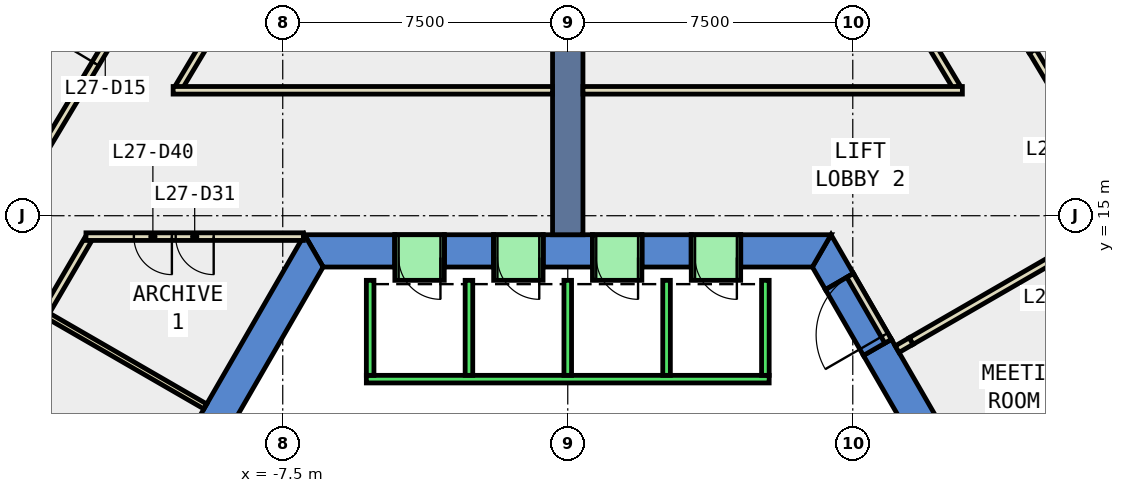
"""IFC4 building model, lengths in metres.
Left out: names, types, materials, properties, quantities, classifications, styles, units other than length and angle.
Written with IfcOpenShell. Run it as: python <this file> out.ifc"""

import sys

from ifc_helpers import new_model, si_unit, direction, frame, frame_2d, origin, place, context, subcontext, project, spatial, polyline, rectangle, outline, extrude, element, fill, save


model = new_model("IFC4")
c1 = context("Model", 3, precision=1e-05, world=origin(), true_north=direction((0.0, 1.0)))
c2 = subcontext(c1, "Body", "Model", "MODEL_VIEW")
j1 = project(units=[si_unit("LENGTHUNIT", "METRE"), si_unit("PLANEANGLEUNIT", "RADIAN")], contexts=[c1])
p1 = place(None, origin())
s1 = spatial("IfcSite", under=j1, at=p1, CompositionType="ELEMENT")
p2 = place(p1, origin())
s2 = spatial("IfcBuilding", under=s1, at=p2, CompositionType="ELEMENT")
p3 = place(p2, frame((0.0, 0.0, 124.4)))
s3 = spatial("IfcBuildingStorey", under=s2, at=p3, CompositionType="ELEMENT", Elevation=124.4)
p4 = place(p3, frame((0.0, 0.0, -0.4)))
e1 = element("IfcWall", 1, at=p4, inside=s3, PredefinedType="SHEAR", context=c2, shape_type="SweptSolid", body=[
    extrude(outline(polyline([(8.517, 11.748), (7.781, 11.323), (12.875, 2.5), (13.856, 2.5), (8.517, 11.748)])), origin(), (0.0, 0.0, 1.0), 4.2),
])
p5 = place(p3, frame((0.0, 0.0, -0.4)))
e2 = element("IfcWall", 2, at=p5, inside=s3, PredefinedType="SHEAR", context=c2, shape_type="SweptSolid", body=[
    extrude(outline(polyline([(6.781, 13.055), (7.517, 13.48), (6.928, 14.5), (6.437, 13.65), (6.781, 13.055)])), origin(), (0.0, 0.0, 1.0), 4.2),
])
p6 = place(p3, frame((0.0, 0.0, 3.6)))
e3 = element("IfcWall", 3, at=p6, inside=s3, PredefinedType="SHEAR", context=c2, shape_type="SweptSolid", body=[
    extrude(outline(polyline([(7.517, 13.48), (6.781, 13.055), (7.781, 11.323), (8.517, 11.748), (7.517, 13.48)])), origin(), (0.0, 0.0, 1.0), 0.2),
])
p7 = place(p3, frame((0.0, 0.0, -0.4)))
e4 = element("IfcWall", 4, at=p7, inside=s3, PredefinedType="SHEAR", context=c2, shape_type="SweptSolid", body=[
    extrude(outline(polyline([(4.55, 14.5), (4.55, 13.65), (6.437, 13.65), (6.928, 14.5), (4.55, 14.5)])), origin(), (0.0, 0.0, 1.0), 4.2),
])
p8 = place(p3, frame((0.0, 0.0, -0.4)))
e5 = element("IfcWall", 5, at=p8, inside=s3, PredefinedType="SHEAR", context=c2, shape_type="SweptSolid", body=[
    extrude(outline(polyline([(1.95, 14.5), (1.95, 13.65), (3.25, 13.65), (3.25, 14.5), (1.95, 14.5)])), origin(), (0.0, 0.0, 1.0), 4.2),
])
p9 = place(p3, frame((0.0, 0.0, -0.4)))
e6 = element("IfcWall", 6, at=p9, inside=s3, PredefinedType="SHEAR", context=c2, shape_type="SweptSolid", body=[
    extrude(outline(polyline([(-0.65, 14.5), (-0.65, 13.65), (0.65, 13.65), (0.65, 14.5), (-0.65, 14.5)])), origin(), (0.0, 0.0, 1.0), 4.2),
])
p10 = place(p3, frame((0.0, 0.0, -0.4)))
e7 = element("IfcWall", 7, at=p10, inside=s3, PredefinedType="SHEAR", context=c2, shape_type="SweptSolid", body=[
    extrude(outline(polyline([(-3.25, 14.5), (-3.25, 13.65), (-1.95, 13.65), (-1.95, 14.5), (-3.25, 14.5)])), origin(), (0.0, 0.0, 1.0), 4.2),
])
p11 = place(p3, frame((0.0, 0.0, -0.4)))
e8 = element("IfcWall", 8, at=p11, inside=s3, PredefinedType="SHEAR", context=c2, shape_type="SweptSolid", body=[
    extrude(outline(polyline([(-4.55, 13.65), (-4.55, 14.5), (-6.928, 14.5), (-6.437, 13.65), (-4.55, 13.65)])), origin(), (0.0, 0.0, 1.0), 4.2),
])
p12 = place(p3, frame((0.0, 0.0, 3.6)))
e9 = element("IfcWall", 9, at=p12, inside=s3, PredefinedType="SHEAR", context=c2, shape_type="SweptSolid", body=[
    extrude(outline(polyline([(3.25, 14.5), (3.25, 13.65), (4.55, 13.65), (4.55, 14.5), (3.25, 14.5)])), origin(), (0.0, 0.0, 1.0), 0.2),
])
p13 = place(p3, frame((0.0, 0.0, 3.6)))
e10 = element("IfcWall", 10, at=p13, inside=s3, PredefinedType="SHEAR", context=c2, shape_type="SweptSolid", body=[
    extrude(outline(polyline([(0.65, 14.5), (0.65, 13.65), (1.95, 13.65), (1.95, 14.5), (0.65, 14.5)])), origin(), (0.0, 0.0, 1.0), 0.2),
])
p14 = place(p3, frame((0.0, 0.0, 3.6)))
e11 = element("IfcWall", 11, at=p14, inside=s3, PredefinedType="SHEAR", context=c2, shape_type="SweptSolid", body=[
    extrude(outline(polyline([(-1.95, 14.5), (-1.95, 13.65), (-0.65, 13.65), (-0.65, 14.5), (-1.95, 14.5)])), origin(), (0.0, 0.0, 1.0), 0.2),
])
p15 = place(p3, frame((0.0, 0.0, 3.6)))
e12 = element("IfcWall", 12, at=p15, inside=s3, PredefinedType="SHEAR", context=c2, shape_type="SweptSolid", body=[
    extrude(outline(polyline([(-4.55, 14.5), (-4.55, 13.65), (-3.25, 13.65), (-3.25, 14.5), (-4.55, 14.5)])), origin(), (0.0, 0.0, 1.0), 0.2),
])
p16 = place(p3, frame((0.0, 0.0, -0.4)))
e13 = element("IfcWall", 13, at=p16, inside=s3, PredefinedType="SHEAR", context=c2, shape_type="SweptSolid", body=[
    extrude(outline(polyline([(-12.267, 5.252), (-11.531, 4.827), (-6.437, 13.65), (-6.928, 14.5), (-12.267, 5.252)])), origin(), (0.0, 0.0, 1.0), 4.2),
])
p17 = place(p3, frame((0.0, 14.5, -0.4), z_axis=(0.0, 0.0, 1.0), x_axis=(0.0, 1.0, 0.0)))
e14 = element("IfcWall", 14, at=p17, inside=s3, PredefinedType="SHEAR", context=c2, shape_type="SweptSolid", body=[
    extrude(rectangle(XDim=9.0, YDim=0.8, at=frame_2d((4.5, 0.0))), origin(), (0.0, 0.0, 1.0), 4.2),
])
p18 = place(p3, frame((-12.628, 14.364, 0.0), z_axis=(0.0, 0.0, 1.0), x_axis=(-0.504457175129, -0.863436713639, 0.0)))
e15 = element("IfcWall", 15, at=p18, inside=s3, PredefinedType="PARTITIONING", context=c2, shape_type="SweptSolid", body=[
    extrude(rectangle(XDim=2.175, YDim=0.2, at=frame_2d((1.087, 0.0))), origin(), (0.0, 0.0, 1.0), 3.8),
])
p19 = place(p3, frame((12.798, 13.873, 0.0), z_axis=(0.0, 0.0, 1.0), x_axis=(-0.866080799279, -0.499904039911, 0.0)))
e16 = element("IfcWall", 16, at=p19, inside=s3, PredefinedType="PARTITIONING", context=c2, shape_type="SweptSolid", body=[
    extrude(rectangle(XDim=4.345, YDim=0.2, at=frame_2d((2.172, 0.0))), origin(), (0.0, 0.0, 1.0), 3.8),
])
for number, where, z_axis, x_axis in (
    (17, (10.232, 18.386, 0.0), (0.0, 0.0, 1.0), (-0.514, 0.858, 0.0)),
    (18, (-8.475, 21.321, 0.0), (0.0, 0.0, 1.0), (-0.514, -0.858, 0.0)),
):
    element("IfcWall", number, at=place(p3, frame(where, z_axis=z_axis, x_axis=x_axis)), inside=s3, PredefinedType="PARTITIONING", context=c2, shape_type="SweptSolid", body=[
        extrude(rectangle(XDim=3.421, YDim=0.2, at=frame_2d((1.71, 0.0))), origin(), (0.0, 0.0, 1.0), 3.8),
    ])
p20 = place(p3, frame((12.228, 19.335, 0.0), z_axis=(0.0, 0.0, 1.0), x_axis=(0.513796731551, -0.857911952736, 0.0)))
e19 = element("IfcWall", 19, at=p20, inside=s3, PredefinedType="PARTITIONING", context=c2, shape_type="SweptSolid", body=[
    extrude(rectangle(XDim=3.493, YDim=0.2, at=frame_2d((1.747, 0.0))), origin(), (0.0, 0.0, 1.0), 3.8),
])
p21 = place(p20, frame((1.247, 0.0, 0.0)))
e20 = element("IfcOpeningElement", 20, at=p21, cuts=e19, PredefinedType="OPENING", context=c2, shape_type="SweptSolid", body=[
    extrude(rectangle(XDim=1.0, YDim=2.1, at=frame_2d((0.5, 1.05))), frame((0.0, 0.11, 0.0), z_axis=(0.0, -1.0, 0.0), x_axis=(1.0, 0.0, 0.0)), (0.0, 0.0, 1.0), 0.22),
])
p22 = place(p3, frame((-14.023, 16.338, 0.0), z_axis=(0.0, 0.0, 1.0), x_axis=(0.513773581048, 0.857925816966, 0.0)))
e21 = element("IfcWall", 21, at=p22, inside=s3, PredefinedType="PARTITIONING", context=c2, shape_type="SweptSolid", body=[
    extrude(rectangle(XDim=7.061, YDim=0.2, at=frame_2d((3.531, 0.0))), origin(), (0.0, 0.0, 1.0), 3.8),
])
p23 = place(p22, frame((3.106, 0.0, 0.0)))
e22 = element("IfcOpeningElement", 22, at=p23, cuts=e21, PredefinedType="OPENING", context=c2, shape_type="SweptSolid", body=[
    extrude(rectangle(XDim=1.0, YDim=2.1, at=frame_2d((0.5, 1.05))), frame((0.0, 0.11, 0.0), z_axis=(0.0, -1.0, 0.0), x_axis=(1.0, 0.0, 0.0)), (0.0, 0.0, 1.0), 0.22),
])
p24 = place(p3, frame((-9.537, 9.981, 0.0), z_axis=(0.0, 0.0, 1.0), x_axis=(-0.866035377451, 0.499982724704, 0.0)))
e23 = element("IfcWall", 23, at=p24, inside=s3, PredefinedType="PARTITIONING", context=c2, shape_type="SweptSolid", body=[
    extrude(rectangle(XDim=4.98, YDim=0.15, at=frame_2d((2.49, 0.0))), origin(), (0.0, 0.0, 1.0), 3.8),
])
p25 = place(p3, frame((-6.957, 14.45, 0.0), z_axis=(0.0, 0.0, 1.0), x_axis=(-1.0, 0.0, 0.0)))
e24 = element("IfcWall", 24, at=p25, inside=s3, PredefinedType="PARTITIONING", context=c2, shape_type="SweptSolid", body=[
    extrude(rectangle(XDim=5.721, YDim=0.2, at=frame_2d((2.86, 0.0))), origin(), (0.0, 0.0, 1.0), 3.8),
])
p26 = place(p25, frame((2.36, 0.0, 0.0)))
e25 = element("IfcOpeningElement", 25, at=p26, cuts=e24, PredefinedType="OPENING", context=c2, shape_type="SweptSolid", body=[
    extrude(rectangle(XDim=1.0, YDim=2.1, at=frame_2d((0.5, 1.05))), frame((0.0, 0.11, 0.0), z_axis=(0.0, -1.0, 0.0), x_axis=(1.0, 0.0, 0.0)), (0.0, 0.0, 1.0), 0.22),
])
p27 = place(p25, frame((3.46, 0.0, 0.0)))
e26 = element("IfcOpeningElement", 26, at=p27, cuts=e24, PredefinedType="OPENING", context=c2, shape_type="SweptSolid", body=[
    extrude(rectangle(XDim=1.0, YDim=2.1, at=frame_2d((0.5, 1.05))), frame((0.0, 0.11, 0.0), z_axis=(0.0, -1.0, 0.0), x_axis=(1.0, 0.0, 0.0)), (0.0, 0.0, 1.0), 0.22),
])
for number, where, z_axis, x_axis in (
    (27, (0.4, 18.3, 0.0), (0.0, 0.0, 1.0), (1.0, 0.0, 0.0)),
    (28, (-10.384, 18.3, 0.0), (0.0, 0.0, 1.0), (1.0, 0.0, 0.0)),
):
    element("IfcWall", number, at=place(p3, frame(where, z_axis=z_axis, x_axis=x_axis)), inside=s3, PredefinedType="PARTITIONING", context=c2, shape_type="SweptSolid", body=[
        extrude(rectangle(XDim=9.984, YDim=0.2, at=frame_2d((4.992, 0.0))), origin(), (0.0, 0.0, 1.0), 3.8),
    ])
p28 = place(p3, frame((12.104, 19.348, 0.0), z_axis=(0.0, 0.0, 1.0), x_axis=(0.85799008499, 0.513666247732, 0.0)))
e29 = element("IfcWall", 29, at=p28, inside=s3, PredefinedType="PARTITIONING", context=c2, shape_type="SweptSolid", body=[
    extrude(rectangle(XDim=7.1, YDim=0.15, at=frame_2d((3.55, 0.0))), origin(), (0.0, 0.0, 1.0), 3.8),
])
p29 = place(p3, frame((8.43, 11.698, 0.0), z_axis=(0.0, 0.0, 1.0), x_axis=(-0.50002537861, 0.866010750942, 0.0)))
e30 = element("IfcWall", 30, at=p29, inside=s3, PredefinedType="PARTITIONING", context=c2, shape_type="SweptSolid", body=[
    extrude(rectangle(XDim=2.0, YDim=0.2, at=frame_2d((1.0, 0.0))), origin(), (0.0, 0.0, 1.0), 2.4),
])
p30 = place(p29, frame((0.19, 0.0, 0.0)))
e31 = element("IfcOpeningElement", 31, at=p30, cuts=e30, PredefinedType="OPENING", context=c2, shape_type="SweptSolid", body=[
    extrude(rectangle(XDim=1.8, YDim=2.1, at=frame_2d((0.9, 1.05))), frame((0.0, 0.11, 0.0), z_axis=(0.0, -1.0, 0.0), x_axis=(1.0, 0.0, 0.0)), (0.0, 0.0, 1.0), 0.22),
])
p31 = place(p3, frame((9.035, 11.701, 0.0), z_axis=(0.0, 0.0, 1.0), x_axis=(-0.865544229481, -0.500832493767, 0.0)))
e32 = element("IfcWall", 32, at=p31, inside=s3, PredefinedType="PARTITIONING", context=c2, shape_type="SweptSolid", body=[
    extrude(rectangle(XDim=0.425, YDim=0.2, at=frame_2d((0.212, 0.0))), origin(), (0.0, 0.0, 1.0), 2.4),
])
p32 = place(p3, frame((5.3, 10.7, 0.0), z_axis=(0.0, 0.0, 1.0), x_axis=(-1.0, 0.0, 0.0)))
e33 = element("IfcWall", 33, at=p32, inside=s3, PredefinedType="STANDARD", context=c2, shape_type="SweptSolid", body=[
    extrude(rectangle(XDim=10.6, YDim=0.2, at=frame_2d((5.3, 0.0))), origin(), (0.0, 0.0, 1.0), 3.8),
])
for number, where, z_axis, x_axis in (
    (34, (5.2, 10.8, 0.0), (0.0, 0.0, 1.0), (0.0, 1.0, 0.0)),
    (35, (2.6, 10.8, 0.0), (0.0, 0.0, 1.0), (0.0, 1.0, 0.0)),
    (36, (0.0, 10.8, 0.0), (0.0, 0.0, 1.0), (0.0, 1.0, 0.0)),
    (37, (-2.6, 10.8, 0.0), (0.0, 0.0, 1.0), (0.0, 1.0, 0.0)),
    (38, (-5.2, 10.8, 0.0), (0.0, 0.0, 1.0), (0.0, 1.0, 0.0)),
):
    element("IfcWall", number, at=place(p3, frame(where, z_axis=z_axis, x_axis=x_axis)), inside=s3, PredefinedType="STANDARD", context=c2, shape_type="SweptSolid", body=[
        extrude(rectangle(XDim=2.5, YDim=0.2, at=frame_2d((1.25, 0.0))), origin(), (0.0, 0.0, 1.0), 3.8),
    ])
p33 = place(p3, frame((4.55, 13.9, 0.0), z_axis=(0.0, 0.0, 1.0), x_axis=(-1.0, 0.0, 0.0)))
e39 = element("IfcWall", 39, at=p33, inside=s3, PredefinedType="STANDARD", context=c2, shape_type="SweptSolid", body=[
    extrude(rectangle(XDim=1.3, YDim=1.2, at=frame_2d((0.65, 0.0))), origin(), (0.0, 0.0, 1.0), 2.4),
])
p34 = place(p33, frame((0.1, 0.0, 0.0)))
e40 = element("IfcOpeningElement", 40, at=p34, cuts=e39, PredefinedType="OPENING", context=c2, shape_type="SweptSolid", body=[
    extrude(rectangle(XDim=1.1, YDim=2.3, at=frame_2d((0.55, 1.15))), frame((0.0, 0.61, 0.0), z_axis=(0.0, -1.0, 0.0), x_axis=(1.0, 0.0, 0.0)), (0.0, 0.0, 1.0), 1.22),
])
p35 = place(p3, frame((1.95, 13.9, 0.0), z_axis=(0.0, 0.0, 1.0), x_axis=(-1.0, 0.0, 0.0)))
e41 = element("IfcWall", 41, at=p35, inside=s3, PredefinedType="STANDARD", context=c2, shape_type="SweptSolid", body=[
    extrude(rectangle(XDim=1.3, YDim=1.2, at=frame_2d((0.65, 0.0))), origin(), (0.0, 0.0, 1.0), 2.4),
])
p36 = place(p35, frame((0.1, 0.0, 0.0)))
e42 = element("IfcOpeningElement", 42, at=p36, cuts=e41, PredefinedType="OPENING", context=c2, shape_type="SweptSolid", body=[
    extrude(rectangle(XDim=1.1, YDim=2.3, at=frame_2d((0.55, 1.15))), frame((0.0, 0.61, 0.0), z_axis=(0.0, -1.0, 0.0), x_axis=(1.0, 0.0, 0.0)), (0.0, 0.0, 1.0), 1.22),
])
p37 = place(p3, frame((-0.65, 13.9, 0.0), z_axis=(0.0, 0.0, 1.0), x_axis=(-1.0, 0.0, 0.0)))
e43 = element("IfcWall", 43, at=p37, inside=s3, PredefinedType="STANDARD", context=c2, shape_type="SweptSolid", body=[
    extrude(rectangle(XDim=1.3, YDim=1.2, at=frame_2d((0.65, 0.0))), origin(), (0.0, 0.0, 1.0), 2.4),
])
p38 = place(p37, frame((0.1, 0.0, 0.0)))
e44 = element("IfcOpeningElement", 44, at=p38, cuts=e43, PredefinedType="OPENING", context=c2, shape_type="SweptSolid", body=[
    extrude(rectangle(XDim=1.1, YDim=2.3, at=frame_2d((0.55, 1.15))), frame((0.0, 0.61, 0.0), z_axis=(0.0, -1.0, 0.0), x_axis=(1.0, 0.0, 0.0)), (0.0, 0.0, 1.0), 1.22),
])
p39 = place(p3, frame((-3.25, 13.9, 0.0), z_axis=(0.0, 0.0, 1.0), x_axis=(-1.0, 0.0, 0.0)))
e45 = element("IfcWall", 45, at=p39, inside=s3, PredefinedType="STANDARD", context=c2, shape_type="SweptSolid", body=[
    extrude(rectangle(XDim=1.3, YDim=1.2, at=frame_2d((0.65, 0.0))), origin(), (0.0, 0.0, 1.0), 2.4),
])
p40 = place(p39, frame((0.1, 0.0, 0.0)))
e46 = element("IfcOpeningElement", 46, at=p40, cuts=e45, PredefinedType="OPENING", context=c2, shape_type="SweptSolid", body=[
    extrude(rectangle(XDim=1.1, YDim=2.3, at=frame_2d((0.55, 1.15))), frame((0.0, 0.61, 0.0), z_axis=(0.0, -1.0, 0.0), x_axis=(1.0, 0.0, 0.0)), (0.0, 0.0, 1.0), 1.22),
])
p41 = place(p23, origin())
e47 = element("IfcDoor", 47, at=p41, inside=s3, OperationType="SINGLE_SWING_LEFT", PredefinedType="DOOR", context=c2, shape_type="SweptSolid", body=[
    extrude(rectangle(XDim=1.0, YDim=2.1, at=frame_2d((0.5, 1.05))), frame((0.0, 0.025, 0.0), z_axis=(0.0, -1.0, 0.0), x_axis=(1.0, 0.0, 0.0)), (0.0, 0.0, 1.0), 0.05),
])
fill(e22, e47)
p42 = place(p26, origin())
e48 = element("IfcDoor", 48, at=p42, inside=s3, OperationType="SINGLE_SWING_LEFT", PredefinedType="DOOR", context=c2, shape_type="SweptSolid", body=[
    extrude(rectangle(XDim=1.0, YDim=2.1, at=frame_2d((0.5, 1.05))), frame((0.0, 0.025, 0.0), z_axis=(0.0, -1.0, 0.0), x_axis=(1.0, 0.0, 0.0)), (0.0, 0.0, 1.0), 0.05),
])
fill(e25, e48)
p43 = place(p27, origin())
e49 = element("IfcDoor", 49, at=p43, inside=s3, OperationType="SINGLE_SWING_RIGHT", PredefinedType="DOOR", context=c2, shape_type="SweptSolid", body=[
    extrude(rectangle(XDim=1.0, YDim=2.1, at=frame_2d((0.5, 1.05))), frame((0.0, 0.025, 0.0), z_axis=(0.0, -1.0, 0.0), x_axis=(1.0, 0.0, 0.0)), (0.0, 0.0, 1.0), 0.05),
])
fill(e26, e49)
p44 = place(p30, origin())
e50 = element("IfcDoor", 50, at=p44, inside=s3, OperationType="DOUBLE_DOOR_SINGLE_SWING", PredefinedType="DOOR", context=c2, shape_type="SweptSolid", body=[
    extrude(rectangle(XDim=1.8, YDim=2.1, at=frame_2d((0.9, 1.05))), frame((0.0, 0.025, 0.0), z_axis=(0.0, -1.0, 0.0), x_axis=(1.0, 0.0, 0.0)), (0.0, 0.0, 1.0), 0.05),
])
fill(e31, e50)
p45 = place(p34, origin())
e51 = element("IfcDoor", 51, at=p45, inside=s3, OperationType="SLIDING_TO_LEFT", PredefinedType="DOOR", context=c2, shape_type="SweptSolid", body=[
    extrude(rectangle(XDim=1.1, YDim=2.3, at=frame_2d((0.55, 1.15))), frame((0.0, 0.025, 0.0), z_axis=(0.0, -1.0, 0.0), x_axis=(1.0, 0.0, 0.0)), (0.0, 0.0, 1.0), 0.05),
])
fill(e40, e51)
p46 = place(p36, origin())
e52 = element("IfcDoor", 52, at=p46, inside=s3, OperationType="SLIDING_TO_LEFT", PredefinedType="DOOR", context=c2, shape_type="SweptSolid", body=[
    extrude(rectangle(XDim=1.1, YDim=2.3, at=frame_2d((0.55, 1.15))), frame((0.0, 0.025, 0.0), z_axis=(0.0, -1.0, 0.0), x_axis=(1.0, 0.0, 0.0)), (0.0, 0.0, 1.0), 0.05),
])
fill(e42, e52)
p47 = place(p38, origin())
e53 = element("IfcDoor", 53, at=p47, inside=s3, OperationType="SLIDING_TO_LEFT", PredefinedType="DOOR", context=c2, shape_type="SweptSolid", body=[
    extrude(rectangle(XDim=1.1, YDim=2.3, at=frame_2d((0.55, 1.15))), frame((0.0, 0.025, 0.0), z_axis=(0.0, -1.0, 0.0), x_axis=(1.0, 0.0, 0.0)), (0.0, 0.0, 1.0), 0.05),
])
fill(e44, e53)
p48 = place(p40, origin())
e54 = element("IfcDoor", 54, at=p48, inside=s3, OperationType="SLIDING_TO_LEFT", PredefinedType="DOOR", context=c2, shape_type="SweptSolid", body=[
    extrude(rectangle(XDim=1.1, YDim=2.3, at=frame_2d((0.55, 1.15))), frame((0.0, 0.025, 0.0), z_axis=(0.0, -1.0, 0.0), x_axis=(1.0, 0.0, 0.0)), (0.0, 0.0, 1.0), 0.05),
])
fill(e46, e54)
save(model, sys.argv[1])
